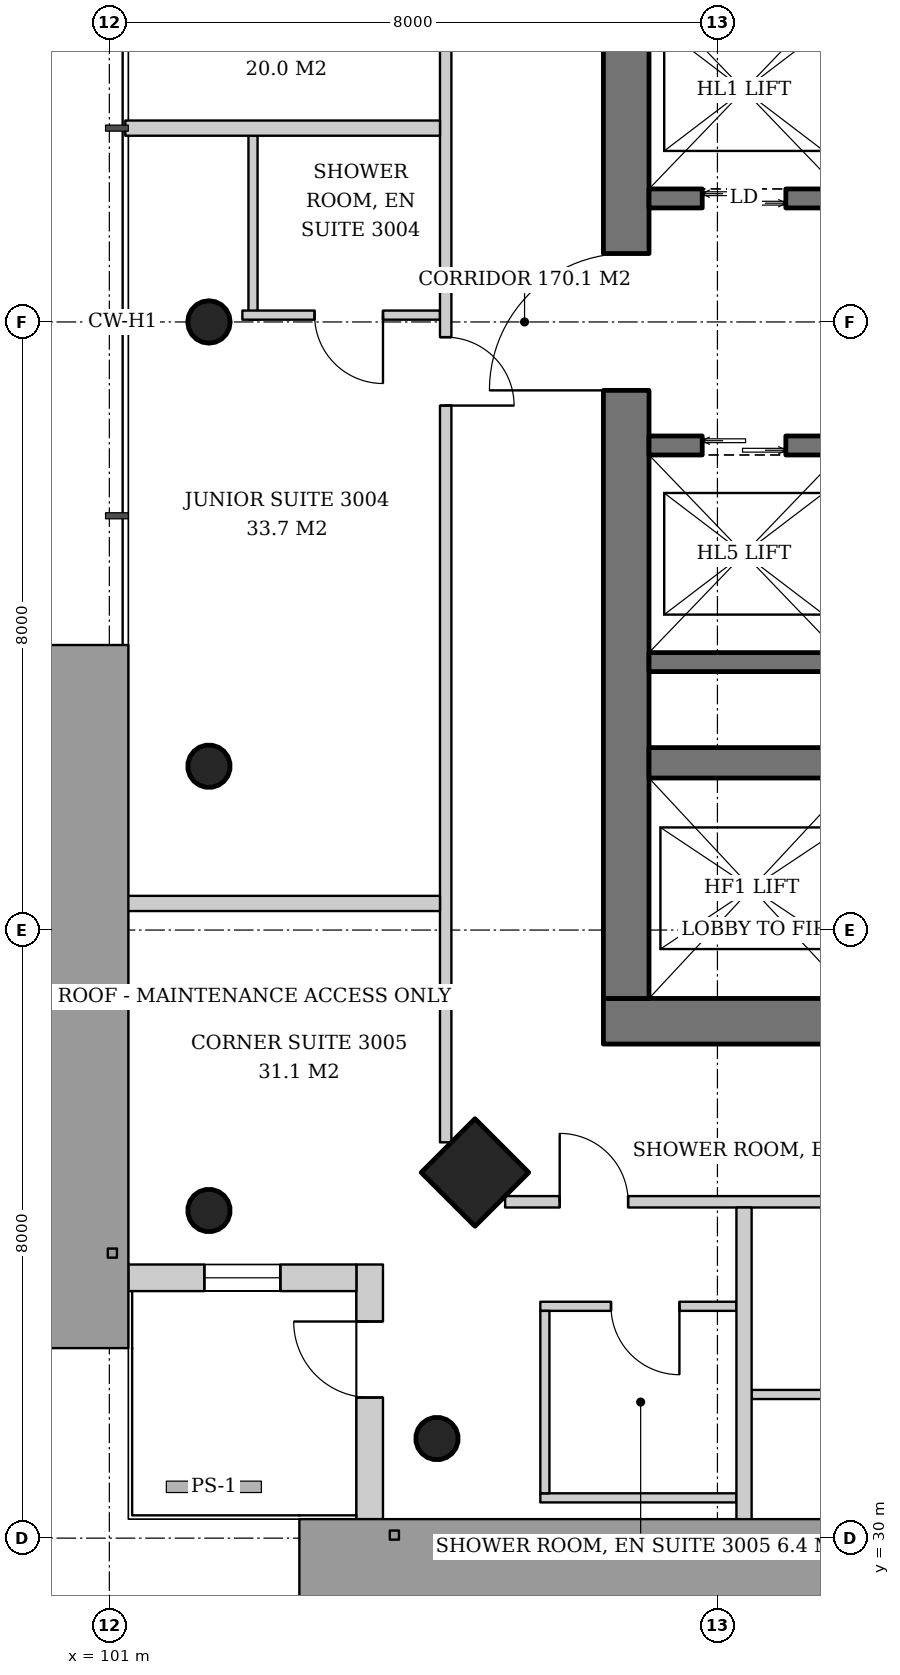
"""IFC4 building model, lengths in metres.
Left out: names, types, materials, properties, quantities, classifications, styles, units other than length and angle.
Written with IfcOpenShell. Run it as: python <this file> out.ifc"""

import sys

from ifc_helpers import new_model, si_unit, direction, frame, frame_2d, origin, origin_2d, place, context, subcontext, project, spatial, rectangle, hollow_circle, extrude, element, fill, save


model = new_model("IFC4")
c1 = context("Model", 3, precision=1e-05, world=origin(), true_north=direction((0.0, 1.0)))
c2 = subcontext(c1, "Body", "Model", "MODEL_VIEW")
j1 = project(units=[si_unit("LENGTHUNIT", "METRE"), si_unit("PLANEANGLEUNIT", "RADIAN")], contexts=[c1])
p1 = place(None, origin())
s1 = spatial("IfcSite", under=j1, at=p1, CompositionType="ELEMENT")
p2 = place(p1, origin())
s2 = spatial("IfcBuilding", under=s1, at=p2, CompositionType="ELEMENT")
p3 = place(p2, frame((0.0, 0.0, 119.8)))
s3 = spatial("IfcBuildingStorey", under=s2, at=p3, CompositionType="ELEMENT", Elevation=119.8)
p4 = place(p3, frame((105.759, 34.759, 0.0), z_axis=(0.043029647111, 0.043029647111, 0.998146732169), x_axis=(-0.707106781187, 0.707106781187, 0.0)))
e1 = element("IfcColumn", 1, at=p4, inside=s3, PredefinedType="COLUMN", context=c2, shape_type="SweptSolid", body=[
    extrude(rectangle(XDim=1.0, YDim=1.0, at=origin_2d()), origin(), (0.0, 0.0, 1.0), 3.807),
])
p5 = place(p3, frame((102.259, 34.259, 0.0), z_axis=(0.043029647111, 0.043029647111, 0.998146732169), x_axis=(-0.707106781187, 0.707106781187, 0.0)))
e2 = element("IfcColumn", 2, at=p5, inside=s3, PredefinedType="COLUMN", context=c2, shape_type="SweptSolid", body=[
    extrude(hollow_circle(Radius=0.28, WallThickness=0.02, at=origin_2d()), origin(), (0.0, 0.0, 1.0), 3.807),
])
p6 = place(p3, frame((102.259, 46.0, 0.0), z_axis=(0.043069538298, 0.0, 0.999072076915), x_axis=(0.0, 1.0, 0.0)))
e3 = element("IfcColumn", 3, at=p6, inside=s3, PredefinedType="COLUMN", context=c2, shape_type="SweptSolid", body=[
    extrude(hollow_circle(Radius=0.28, WallThickness=0.02, at=origin_2d()), origin(), (0.0, 0.0, 1.0), 3.803),
])
p7 = place(p3, frame((102.259, 40.129, 0.0), z_axis=(0.043059584825, 0.021497706284, 0.998841188968), x_axis=(-0.446680166538, 0.894693706707, 0.0)))
e4 = element("IfcColumn", 4, at=p7, inside=s3, PredefinedType="COLUMN", context=c2, shape_type="SweptSolid", body=[
    extrude(hollow_circle(Radius=0.28, WallThickness=0.02, at=origin_2d()), origin(), (0.0, 0.0, 1.0), 3.804),
])
p8 = place(p3, frame((105.259, 31.259, 0.0), z_axis=(0.043029647111, 0.043029647111, 0.998146732169), x_axis=(-0.707106781187, 0.707106781187, 0.0)))
e5 = element("IfcColumn", 5, at=p8, inside=s3, PredefinedType="COLUMN", context=c2, shape_type="SweptSolid", body=[
    extrude(hollow_circle(Radius=0.28, WallThickness=0.02, at=origin_2d()), origin(), (0.0, 0.0, 1.0), 3.807),
])
p9 = place(p3, frame((107.5, 36.8, 0.0), z_axis=(0.0, 0.0, 1.0), x_axis=(1.0, 0.0, 0.0)))
e6 = element("IfcWall", 6, at=p9, inside=s3, PredefinedType="SHEAR", context=c2, shape_type="SweptSolid", body=[
    extrude(rectangle(XDim=19.0, YDim=0.6, at=frame_2d((9.5, 0.0))), origin(), (0.0, 0.0, 1.0), 3.8),
])
p10 = place(p9, frame((3.9, 0.0, 0.0)))
e7 = element("IfcOpeningElement", 7, at=p10, cuts=e6, PredefinedType="OPENING", context=c2, shape_type="SweptSolid", body=[
    extrude(rectangle(XDim=1.0, YDim=2.1, at=frame_2d((0.5, 1.05))), frame((0.0, 0.31, 0.0), z_axis=(0.0, -1.0, 0.0), x_axis=(1.0, 0.0, 0.0)), (0.0, 0.0, 1.0), 0.62),
])
p11 = place(p9, frame((14.61, 0.0, 0.0)))
e8 = element("IfcOpeningElement", 8, at=p11, cuts=e6, PredefinedType="OPENING", context=c2, shape_type="SweptSolid", body=[
    extrude(rectangle(XDim=1.0, YDim=2.1, at=frame_2d((0.5, 1.05))), frame((0.0, 0.31, 0.0), z_axis=(0.0, -1.0, 0.0), x_axis=(1.0, 0.0, 0.0)), (0.0, 0.0, 1.0), 0.62),
])
p12 = place(p9, frame((16.639, 0.0, 0.0)))
e9 = element("IfcOpeningElement", 9, at=p12, cuts=e6, PredefinedType="OPENING", context=c2, shape_type="SweptSolid", body=[
    extrude(rectangle(XDim=1.0, YDim=2.1, at=frame_2d((0.5, 1.05))), frame((0.0, 0.31, 0.0), z_axis=(0.0, -1.0, 0.0), x_axis=(1.0, 0.0, 0.0)), (0.0, 0.0, 1.0), 0.62),
])
p13 = place(p3, frame((107.8, 37.1, 0.0), z_axis=(0.0, 0.0, 1.0), x_axis=(0.0, 1.0, 0.0)))
e10 = element("IfcWall", 10, at=p13, inside=s3, PredefinedType="SHEAR", context=c2, shape_type="SweptSolid", body=[
    extrude(rectangle(XDim=17.8, YDim=0.6, at=frame_2d((8.9, 0.0))), origin(), (0.0, 0.0, 1.0), 3.8),
])
p14 = place(p13, frame((8.0, 0.0, 0.0)))
e11 = element("IfcOpeningElement", 11, at=p14, cuts=e10, PredefinedType="OPENING", context=c2, shape_type="SweptSolid", body=[
    extrude(rectangle(XDim=1.8, YDim=2.4, at=frame_2d((0.9, 1.2))), frame((0.0, 0.31, 0.0), z_axis=(0.0, -1.0, 0.0), x_axis=(1.0, 0.0, 0.0)), (0.0, 0.0, 1.0), 0.62),
])
p15 = place(p3, frame((108.1, 40.2, 0.0), z_axis=(0.0, 0.0, 1.0), x_axis=(1.0, 0.0, 0.0)))
e12 = element("IfcWall", 12, at=p15, inside=s3, PredefinedType="SHEAR", context=c2, shape_type="SweptSolid", body=[
    extrude(rectangle(XDim=17.8, YDim=0.4, at=frame_2d((8.9, 0.0))), origin(), (0.0, 0.0, 1.0), 3.8),
])
p16 = place(p3, frame((104.425, 30.25, 0.0), z_axis=(0.0, 0.0, 1.0), x_axis=(0.0, 1.0, 0.0)))
e13 = element("IfcWall", 13, at=p16, inside=s3, PredefinedType="SOLIDWALL", context=c2, shape_type="SweptSolid", body=[
    extrude(rectangle(XDim=3.35, YDim=0.35, at=frame_2d((1.675, 0.0))), origin(), (0.0, 0.0, 1.0), 3.6),
])
p17 = place(p16, frame((1.6, 0.0, 0.0)))
e14 = element("IfcOpeningElement", 14, at=p17, cuts=e13, PredefinedType="OPENING", context=c2, shape_type="SweptSolid", body=[
    extrude(rectangle(XDim=1.0, YDim=2.4, at=frame_2d((0.5, 1.2))), frame((0.0, 0.185, 0.0), z_axis=(0.0, -1.0, 0.0), x_axis=(1.0, 0.0, 0.0)), (0.0, 0.0, 1.0), 0.37),
])
p18 = place(p3, frame((104.25, 33.425, 0.0), z_axis=(0.0, 0.0, 1.0), x_axis=(-1.0, 0.0, 0.0)))
e15 = element("IfcWall", 15, at=p18, inside=s3, PredefinedType="SOLIDWALL", context=c2, shape_type="SweptSolid", body=[
    extrude(rectangle(XDim=3.0, YDim=0.35, at=frame_2d((1.5, 0.0))), origin(), (0.0, 0.0, 1.0), 3.6),
])
p19 = place(p18, frame((1.0, 0.0, 0.9)))
e16 = element("IfcOpeningElement", 16, at=p19, cuts=e15, PredefinedType="OPENING", context=c2, shape_type="SweptSolid", body=[
    extrude(rectangle(XDim=1.0, YDim=2.4, at=frame_2d((0.5, 1.2))), frame((0.0, 0.185, 0.0), z_axis=(0.0, -1.0, 0.0), x_axis=(1.0, 0.0, 0.0)), (0.0, 0.0, 1.0), 0.37),
])
p20 = place(p3, frame((108.1, 47.625, 0.0), z_axis=(0.0, 0.0, 1.0), x_axis=(1.0, 0.0, 0.0)))
e17 = element("IfcWall", 17, at=p20, inside=s3, PredefinedType="SHEAR", context=c2, shape_type="SweptSolid", body=[
    extrude(rectangle(XDim=12.83, YDim=0.25, at=frame_2d((6.415, 0.0))), origin(), (0.0, 0.0, 1.0), 3.8),
])
p21 = place(p20, frame((0.7, 0.0, 0.0)))
e18 = element("IfcOpeningElement", 18, at=p21, cuts=e17, PredefinedType="OPENING", context=c2, shape_type="SweptSolid", body=[
    extrude(rectangle(XDim=1.1, YDim=2.2, at=frame_2d((0.55, 1.1))), frame((0.0, 0.135, 0.0), z_axis=(0.0, -1.0, 0.0), x_axis=(1.0, 0.0, 0.0)), (0.0, 0.0, 1.0), 0.27),
])
p22 = place(p20, frame((3.45, 0.0, 0.0)))
e19 = element("IfcOpeningElement", 19, at=p22, cuts=e17, PredefinedType="OPENING", context=c2, shape_type="SweptSolid", body=[
    extrude(rectangle(XDim=1.1, YDim=2.2, at=frame_2d((0.55, 1.1))), frame((0.0, 0.135, 0.0), z_axis=(0.0, -1.0, 0.0), x_axis=(1.0, 0.0, 0.0)), (0.0, 0.0, 1.0), 0.27),
])
p23 = place(p20, frame((6.2, 0.0, 0.0)))
e20 = element("IfcOpeningElement", 20, at=p23, cuts=e17, PredefinedType="OPENING", context=c2, shape_type="SweptSolid", body=[
    extrude(rectangle(XDim=1.1, YDim=2.2, at=frame_2d((0.55, 1.1))), frame((0.0, 0.135, 0.0), z_axis=(0.0, -1.0, 0.0), x_axis=(1.0, 0.0, 0.0)), (0.0, 0.0, 1.0), 0.27),
])
p24 = place(p20, frame((8.95, 0.0, 0.0)))
e21 = element("IfcOpeningElement", 21, at=p24, cuts=e17, PredefinedType="OPENING", context=c2, shape_type="SweptSolid", body=[
    extrude(rectangle(XDim=1.1, YDim=2.2, at=frame_2d((0.55, 1.1))), frame((0.0, 0.135, 0.0), z_axis=(0.0, -1.0, 0.0), x_axis=(1.0, 0.0, 0.0)), (0.0, 0.0, 1.0), 0.27),
])
p25 = place(p20, frame((11.515, 0.0, 0.0)))
e22 = element("IfcOpeningElement", 22, at=p25, cuts=e17, PredefinedType="OPENING", context=c2, shape_type="SweptSolid", body=[
    extrude(rectangle(XDim=0.8, YDim=2.0, at=frame_2d((0.4, 1.0))), frame((0.0, 0.135, 0.0), z_axis=(0.0, -1.0, 0.0), x_axis=(1.0, 0.0, 0.0)), (0.0, 0.0, 1.0), 0.27),
])
p26 = place(p3, frame((108.1, 41.525, 0.0), z_axis=(0.0, 0.0, 1.0), x_axis=(1.0, 0.0, 0.0)))
e23 = element("IfcWall", 23, at=p26, inside=s3, PredefinedType="SHEAR", context=c2, shape_type="SweptSolid", body=[
    extrude(rectangle(XDim=11.0, YDim=0.25, at=frame_2d((5.5, 0.0))), origin(), (0.0, 0.0, 1.0), 3.8),
])
p27 = place(p3, frame((108.1, 44.375, 0.0), z_axis=(0.0, 0.0, 1.0), x_axis=(1.0, 0.0, 0.0)))
e24 = element("IfcWall", 24, at=p27, inside=s3, PredefinedType="SHEAR", context=c2, shape_type="SweptSolid", body=[
    extrude(rectangle(XDim=12.83, YDim=0.25, at=frame_2d((6.415, 0.0))), origin(), (0.0, 0.0, 1.0), 3.8),
])
p28 = place(p27, frame((0.7, 0.0, 0.0)))
e25 = element("IfcOpeningElement", 25, at=p28, cuts=e24, PredefinedType="OPENING", context=c2, shape_type="SweptSolid", body=[
    extrude(rectangle(XDim=1.1, YDim=2.2, at=frame_2d((0.55, 1.1))), frame((0.0, 0.135, 0.0), z_axis=(0.0, -1.0, 0.0), x_axis=(1.0, 0.0, 0.0)), (0.0, 0.0, 1.0), 0.27),
])
p29 = place(p27, frame((3.45, 0.0, 0.0)))
e26 = element("IfcOpeningElement", 26, at=p29, cuts=e24, PredefinedType="OPENING", context=c2, shape_type="SweptSolid", body=[
    extrude(rectangle(XDim=1.1, YDim=2.2, at=frame_2d((0.55, 1.1))), frame((0.0, 0.135, 0.0), z_axis=(0.0, -1.0, 0.0), x_axis=(1.0, 0.0, 0.0)), (0.0, 0.0, 1.0), 0.27),
])
p30 = place(p27, frame((6.2, 0.0, 0.0)))
e27 = element("IfcOpeningElement", 27, at=p30, cuts=e24, PredefinedType="OPENING", context=c2, shape_type="SweptSolid", body=[
    extrude(rectangle(XDim=1.1, YDim=2.2, at=frame_2d((0.55, 1.1))), frame((0.0, 0.135, 0.0), z_axis=(0.0, -1.0, 0.0), x_axis=(1.0, 0.0, 0.0)), (0.0, 0.0, 1.0), 0.27),
])
p31 = place(p27, frame((9.0, 0.0, 0.0)))
e28 = element("IfcOpeningElement", 28, at=p31, cuts=e24, PredefinedType="OPENING", context=c2, shape_type="SweptSolid", body=[
    extrude(rectangle(XDim=1.0, YDim=2.1, at=frame_2d((0.5, 1.05))), frame((0.0, 0.135, 0.0), z_axis=(0.0, -1.0, 0.0), x_axis=(1.0, 0.0, 0.0)), (0.0, 0.0, 1.0), 0.27),
])
p32 = place(p27, frame((11.515, 0.0, 0.0)))
e29 = element("IfcOpeningElement", 29, at=p32, cuts=e24, PredefinedType="OPENING", context=c2, shape_type="SweptSolid", body=[
    extrude(rectangle(XDim=0.8, YDim=2.0, at=frame_2d((0.4, 1.0))), frame((0.0, 0.135, 0.0), z_axis=(0.0, -1.0, 0.0), x_axis=(1.0, 0.0, 0.0)), (0.0, 0.0, 1.0), 0.27),
])
p33 = place(p3, frame((102.89, 48.45, 0.0), z_axis=(0.0, 0.0, 1.0), x_axis=(0.0, -1.0, 0.0)))
e30 = element("IfcWall", 30, at=p33, inside=s3, PredefinedType="PARTITIONING", context=c2, shape_type="SweptSolid", body=[
    extrude(rectangle(XDim=2.42, YDim=0.12, at=frame_2d((1.21, 0.0))), origin(), (0.0, 0.0, 1.0), 3.0),
])
p34 = place(p3, frame((105.35, 46.09, 0.0), z_axis=(0.0, 0.0, 1.0), x_axis=(-1.0, 0.0, 0.0)))
e31 = element("IfcWall", 31, at=p34, inside=s3, PredefinedType="PARTITIONING", context=c2, shape_type="SweptSolid", body=[
    extrude(rectangle(XDim=2.6, YDim=0.12, at=frame_2d((1.3, 0.0))), origin(), (0.0, 0.0, 1.0), 3.6),
])
p35 = place(p34, frame((0.75, 0.0, 0.0)))
e32 = element("IfcOpeningElement", 32, at=p35, cuts=e31, PredefinedType="OPENING", context=c2, shape_type="SweptSolid", body=[
    extrude(rectangle(XDim=0.9, YDim=2.1, at=frame_2d((0.45, 1.05))), frame((0.0, 0.07, 0.0), z_axis=(0.0, -1.0, 0.0), x_axis=(1.0, 0.0, 0.0)), (0.0, 0.0, 1.0), 0.14),
])
p36 = place(p3, frame((105.425, 56.793, 0.0), z_axis=(0.0, 0.0, 1.0), x_axis=(0.0, -1.0, 0.0)))
e33 = element("IfcWall", 33, at=p36, inside=s3, PredefinedType="PARTITIONING", context=c2, shape_type="SweptSolid", body=[
    extrude(rectangle(XDim=21.586, YDim=0.15, at=frame_2d((10.793, 0.0))), origin(), (0.0, 0.0, 1.0), 2.9),
])
p37 = place(p36, frame((0.718, 0.0, 0.0)))
e34 = element("IfcOpeningElement", 34, at=p37, cuts=e33, PredefinedType="OPENING", context=c2, shape_type="SweptSolid", body=[
    extrude(rectangle(XDim=0.9, YDim=2.1, at=frame_2d((0.45, 1.05))), frame((0.0, 0.085, 0.0), z_axis=(0.0, -1.0, 0.0), x_axis=(1.0, 0.0, 0.0)), (0.0, 0.0, 1.0), 0.17),
])
p38 = place(p36, frame((5.843, 0.0, 0.0)))
e35 = element("IfcOpeningElement", 35, at=p38, cuts=e33, PredefinedType="OPENING", context=c2, shape_type="SweptSolid", body=[
    extrude(rectangle(XDim=1.0, YDim=2.1, at=frame_2d((0.5, 1.05))), frame((0.0, 0.085, 0.0), z_axis=(0.0, -1.0, 0.0), x_axis=(1.0, 0.0, 0.0)), (0.0, 0.0, 1.0), 0.17),
])
p39 = place(p36, frame((10.993, 0.0, 0.0)))
e36 = element("IfcOpeningElement", 36, at=p39, cuts=e33, PredefinedType="OPENING", context=c2, shape_type="SweptSolid", body=[
    extrude(rectangle(XDim=0.9, YDim=2.1, at=frame_2d((0.45, 1.05))), frame((0.0, 0.085, 0.0), z_axis=(0.0, -1.0, 0.0), x_axis=(1.0, 0.0, 0.0)), (0.0, 0.0, 1.0), 0.17),
])
for number, where, z_axis, x_axis in (
    (37, (105.35, 48.55, 0.0), (0.0, 0.0, 1.0), (-1.0, 0.0, 0.0)),
    (38, (105.35, 38.35, 0.0), (0.0, 0.0, 1.0), (-1.0, 0.0, 0.0)),
):
    element("IfcWall", number, at=place(p3, frame(where, z_axis=z_axis, x_axis=x_axis)), inside=s3, PredefinedType="PARTITIONING", context=c2, shape_type="SweptSolid", body=[
        extrude(rectangle(XDim=4.14, YDim=0.2, at=frame_2d((2.07, 0.0))), origin(), (0.0, 0.0, 1.0), 3.2),
    ])
p40 = place(p3, frame((109.25, 33.05, 0.0), z_axis=(0.0, 0.0, 1.0), x_axis=(-1.0, 0.0, 0.0)))
e39 = element("IfcWall", 39, at=p40, inside=s3, PredefinedType="PARTITIONING", context=c2, shape_type="SweptSolid", body=[
    extrude(rectangle(XDim=2.58, YDim=0.12, at=frame_2d((1.29, 0.0))), origin(), (0.0, 0.0, 1.0), 2.9),
])
p41 = place(p40, frame((0.75, 0.0, 0.0)))
e40 = element("IfcOpeningElement", 40, at=p41, cuts=e39, PredefinedType="OPENING", context=c2, shape_type="SweptSolid", body=[
    extrude(rectangle(XDim=0.9, YDim=2.1, at=frame_2d((0.45, 1.05))), frame((0.0, 0.07, 0.0), z_axis=(0.0, -1.0, 0.0), x_axis=(1.0, 0.0, 0.0)), (0.0, 0.0, 1.0), 0.14),
])
p42 = place(p3, frame((109.25, 30.53, 0.0), z_axis=(0.0, 0.0, 1.0), x_axis=(-1.0, 0.0, 0.0)))
e41 = element("IfcWall", 41, at=p42, inside=s3, PredefinedType="PARTITIONING", context=c2, shape_type="SweptSolid", body=[
    extrude(rectangle(XDim=2.58, YDim=0.12, at=frame_2d((1.29, 0.0))), origin(), (0.0, 0.0, 1.0), 3.6),
])
p43 = place(p3, frame((106.73, 32.99, 0.0), z_axis=(0.0, 0.0, 1.0), x_axis=(0.0, -1.0, 0.0)))
e42 = element("IfcWall", 42, at=p43, inside=s3, PredefinedType="PARTITIONING", context=c2, shape_type="SweptSolid", body=[
    extrude(rectangle(XDim=2.4, YDim=0.12, at=frame_2d((1.2, 0.0))), origin(), (0.0, 0.0, 1.0), 3.2),
])
p44 = place(p3, frame((109.45, 31.89, 0.0), z_axis=(0.0, 0.0, 1.0), x_axis=(1.0, 0.0, 0.0)))
e43 = element("IfcWall", 43, at=p44, inside=s3, PredefinedType="PARTITIONING", context=c2, shape_type="SweptSolid", body=[
    extrude(rectangle(XDim=2.42, YDim=0.12, at=frame_2d((1.21, 0.0))), origin(), (0.0, 0.0, 1.0), 3.0),
])
p45 = place(p3, frame((106.207, 34.425, 0.0), z_axis=(0.0, 0.0, 1.0), x_axis=(1.0, 0.0, 0.0)))
e44 = element("IfcWall", 44, at=p45, inside=s3, PredefinedType="PARTITIONING", context=c2, shape_type="SweptSolid", body=[
    extrude(rectangle(XDim=21.586, YDim=0.15, at=frame_2d((10.793, 0.0))), origin(), (0.0, 0.0, 1.0), 2.9),
])
p46 = place(p45, frame((0.718, 0.0, 0.0)))
e45 = element("IfcOpeningElement", 45, at=p46, cuts=e44, PredefinedType="OPENING", context=c2, shape_type="SweptSolid", body=[
    extrude(rectangle(XDim=0.9, YDim=2.1, at=frame_2d((0.45, 1.05))), frame((0.0, 0.085, 0.0), z_axis=(0.0, -1.0, 0.0), x_axis=(1.0, 0.0, 0.0)), (0.0, 0.0, 1.0), 0.17),
])
p47 = place(p45, frame((5.893, 0.0, 0.0)))
e46 = element("IfcOpeningElement", 46, at=p47, cuts=e44, PredefinedType="OPENING", context=c2, shape_type="SweptSolid", body=[
    extrude(rectangle(XDim=0.9, YDim=2.1, at=frame_2d((0.45, 1.05))), frame((0.0, 0.085, 0.0), z_axis=(0.0, -1.0, 0.0), x_axis=(1.0, 0.0, 0.0)), (0.0, 0.0, 1.0), 0.17),
])
p48 = place(p45, frame((16.043, 0.0, 0.0)))
e47 = element("IfcOpeningElement", 47, at=p48, cuts=e44, PredefinedType="OPENING", context=c2, shape_type="SweptSolid", body=[
    extrude(rectangle(XDim=1.0, YDim=2.1, at=frame_2d((0.5, 1.05))), frame((0.0, 0.085, 0.0), z_axis=(0.0, -1.0, 0.0), x_axis=(1.0, 0.0, 0.0)), (0.0, 0.0, 1.0), 0.17),
])
p49 = place(p3, frame((109.35, 34.35, 0.0), z_axis=(0.0, 0.0, 1.0), x_axis=(0.0, -1.0, 0.0)))
e48 = element("IfcWall", 48, at=p49, inside=s3, PredefinedType="PARTITIONING", context=c2, shape_type="SweptSolid", body=[
    extrude(rectangle(XDim=4.14, YDim=0.2, at=frame_2d((2.07, 0.0))), origin(), (0.0, 0.0, 1.0), 3.2),
])
p50 = place(p17, origin())
e49 = element("IfcDoor", 49, at=p50, inside=s3, OperationType="SINGLE_SWING_RIGHT", PredefinedType="DOOR", context=c2, shape_type="SweptSolid", body=[
    extrude(rectangle(XDim=1.0, YDim=2.4, at=frame_2d((0.5, 1.2))), frame((0.0, 0.025, 0.0), z_axis=(0.0, -1.0, 0.0), x_axis=(1.0, 0.0, 0.0)), (0.0, 0.0, 1.0), 0.05),
])
fill(e14, e49)
p51 = place(p19, origin())
e50 = element("IfcWindow", 50, at=p51, inside=s3, PartitioningType="SINGLE_PANEL", PredefinedType="WINDOW", context=c2, shape_type="SweptSolid", body=[
    extrude(rectangle(XDim=1.0, YDim=2.4, at=frame_2d((0.5, 1.2))), frame((0.0, 0.03, 0.0), z_axis=(0.0, -1.0, 0.0), x_axis=(1.0, 0.0, 0.0)), (0.0, 0.0, 1.0), 0.06),
])
fill(e16, e50)
p52 = place(p21, origin())
e51 = element("IfcDoor", 51, at=p52, inside=s3, OperationType="DOUBLE_DOOR_SLIDING", PredefinedType="DOOR", context=c2, shape_type="SweptSolid", body=[
    extrude(rectangle(XDim=1.1, YDim=2.2, at=frame_2d((0.55, 1.1))), frame((0.0, 0.025, 0.0), z_axis=(0.0, -1.0, 0.0), x_axis=(1.0, 0.0, 0.0)), (0.0, 0.0, 1.0), 0.05),
])
fill(e18, e51)
p53 = place(p28, origin())
e52 = element("IfcDoor", 52, at=p53, inside=s3, OperationType="DOUBLE_DOOR_SLIDING", PredefinedType="DOOR", context=c2, shape_type="SweptSolid", body=[
    extrude(rectangle(XDim=1.1, YDim=2.2, at=frame_2d((0.55, 1.1))), frame((0.0, 0.025, 0.0), z_axis=(0.0, -1.0, 0.0), x_axis=(1.0, 0.0, 0.0)), (0.0, 0.0, 1.0), 0.05),
])
fill(e25, e52)
p54 = place(p14, origin())
e53 = element("IfcDoor", 53, at=p54, inside=s3, OperationType="DOUBLE_DOOR_SINGLE_SWING", PredefinedType="DOOR", context=c2, shape_type="SweptSolid", body=[
    extrude(rectangle(XDim=1.8, YDim=2.4, at=frame_2d((0.9, 1.2))), frame((0.0, 0.025, 0.0), z_axis=(0.0, -1.0, 0.0), x_axis=(1.0, 0.0, 0.0)), (0.0, 0.0, 1.0), 0.05),
])
fill(e11, e53)
p55 = place(p35, origin())
e54 = element("IfcDoor", 54, at=p55, inside=s3, OperationType="SINGLE_SWING_LEFT", PredefinedType="DOOR", context=c2, shape_type="SweptSolid", body=[
    extrude(rectangle(XDim=0.9, YDim=2.1, at=frame_2d((0.45, 1.05))), frame((0.0, 0.025, 0.0), z_axis=(0.0, -1.0, 0.0), x_axis=(1.0, 0.0, 0.0)), (0.0, 0.0, 1.0), 0.05),
])
fill(e32, e54)
p56 = place(p39, origin())
e55 = element("IfcDoor", 55, at=p56, inside=s3, OperationType="SINGLE_SWING_RIGHT", PredefinedType="DOOR", context=c2, shape_type="SweptSolid", body=[
    extrude(rectangle(XDim=0.9, YDim=2.1, at=frame_2d((0.45, 1.05))), frame((0.0, 0.025, 0.0), z_axis=(0.0, -1.0, 0.0), x_axis=(1.0, 0.0, 0.0)), (0.0, 0.0, 1.0), 0.05),
])
fill(e36, e55)
p57 = place(p41, origin())
e56 = element("IfcDoor", 56, at=p57, inside=s3, OperationType="SINGLE_SWING_LEFT", PredefinedType="DOOR", context=c2, shape_type="SweptSolid", body=[
    extrude(rectangle(XDim=0.9, YDim=2.1, at=frame_2d((0.45, 1.05))), frame((0.0, 0.025, 0.0), z_axis=(0.0, -1.0, 0.0), x_axis=(1.0, 0.0, 0.0)), (0.0, 0.0, 1.0), 0.05),
])
fill(e40, e56)
p58 = place(p46, origin())
e57 = element("IfcDoor", 57, at=p58, inside=s3, OperationType="SINGLE_SWING_LEFT", PredefinedType="DOOR", context=c2, shape_type="SweptSolid", body=[
    extrude(rectangle(XDim=0.9, YDim=2.1, at=frame_2d((0.45, 1.05))), frame((0.0, 0.025, 0.0), z_axis=(0.0, -1.0, 0.0), x_axis=(1.0, 0.0, 0.0)), (0.0, 0.0, 1.0), 0.05),
])
fill(e45, e57)
save(model, sys.argv[1])
